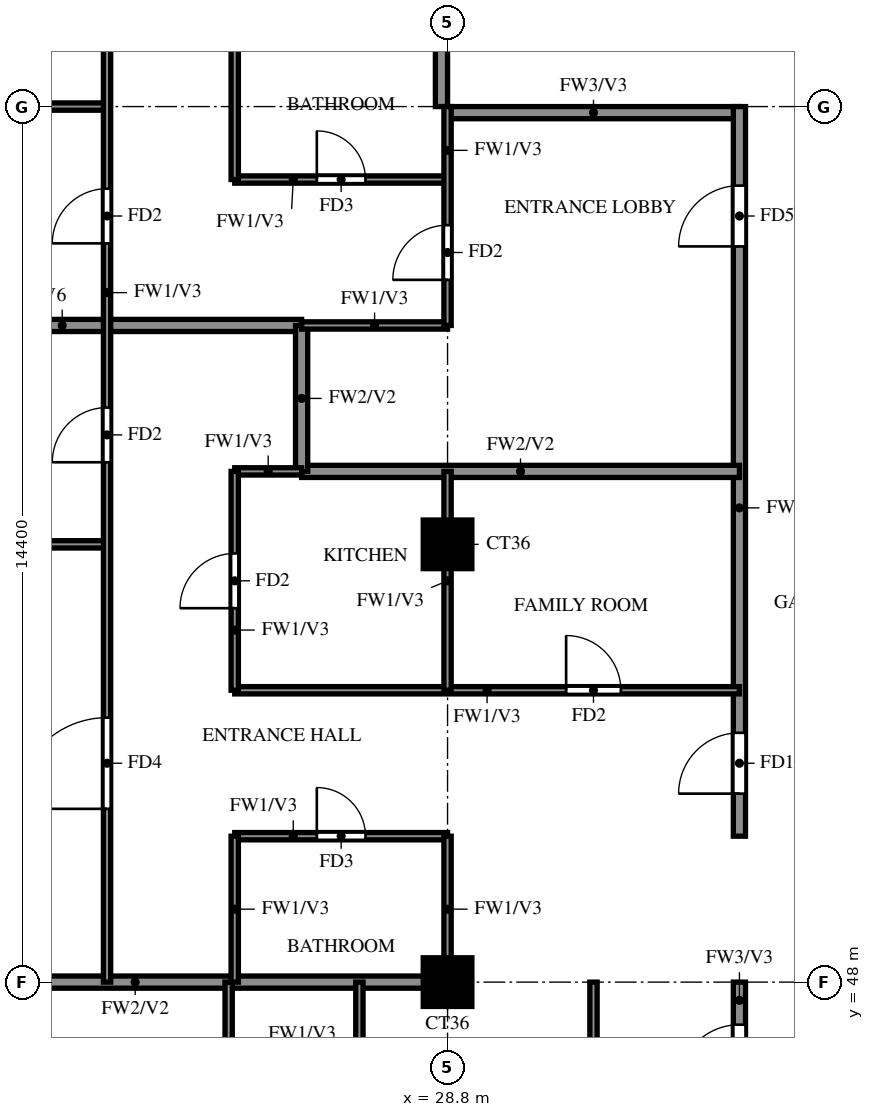
"""IFC4 building model, lengths in metres.
Left out: names, types, materials, properties, quantities, classifications, styles, units other than length and angle.
Written with IfcOpenShell. Run it as: python <this file> out.ifc"""

import sys

from ifc_helpers import new_model, si_unit, direction, frame, frame_2d, origin, origin_2d, place, context, subcontext, project, spatial, rectangle, extrude, source, transform, mapped, element, fill, save


model = new_model("IFC4")
c1 = context("Model", 3, precision=1e-05, world=origin(), true_north=direction((0.0, 1.0)))
c2 = subcontext(c1, "Body", "Model", "MODEL_VIEW")
j1 = project(units=[si_unit("LENGTHUNIT", "METRE"), si_unit("PLANEANGLEUNIT", "RADIAN")], contexts=[c1])
p1 = place(None, origin())
s1 = spatial("IfcSite", under=j1, at=p1, CompositionType="ELEMENT")
p2 = place(p1, origin())
s2 = spatial("IfcBuilding", under=s1, at=p2, CompositionType="ELEMENT")
p3 = place(p2, frame((0.0, 0.0, 236.0)))
s3 = spatial("IfcBuildingStorey", under=s2, at=p3, CompositionType="ELEMENT", Elevation=236.0)
m1 = source(origin(), c2, "Body", "SweptSolid", [
    extrude(rectangle(XDim=0.8, YDim=0.8, at=origin_2d()), origin(), (0.0, 0.0, 1.0), 3.22),
])
for number, where, z_axis, x_axis in (
    (1, (28.8, 48.0, 0.0), (0.0, 0.0, 1.0), (1.0, 0.0, 0.0)),
    (2, (28.8, 55.2, 0.0), (0.0, 0.0, 1.0), (1.0, 0.0, 0.0)),
):
    element("IfcColumn", number, at=place(p3, frame(where, z_axis=z_axis, x_axis=x_axis)), inside=s3, PredefinedType="COLUMN", context=c2, shape_type="MappedRepresentation", body=[
        mapped(m1, transform((0.0, 0.0, 0.0))),
    ])
p4 = place(p3, frame((28.8, 62.3, 0.0), z_axis=(0.0, 0.0, 1.0), x_axis=(1.0, 0.0, 0.0)))
e3 = element("IfcWall", 3, at=p4, inside=s3, PredefinedType="SOLIDWALL", context=c2, shape_type="SweptSolid", body=[
    extrude(rectangle(XDim=4.8, YDim=0.2, at=frame_2d((2.4, 0.0))), origin(), (0.0, 0.0, 1.0), 3.22),
])
p5 = place(p3, frame((28.7, 62.4, 0.0), z_axis=(0.0, 0.0, 1.0), x_axis=(0.0, 1.0, 0.0)))
e4 = element("IfcWall", 4, at=p5, inside=s3, PredefinedType="SOLIDWALL", context=c2, shape_type="SweptSolid", body=[
    extrude(rectangle(XDim=15.6, YDim=0.2, at=frame_2d((7.8, 0.0))), origin(), (0.0, 0.0, 1.0), 3.22),
])
p6 = place(p3, frame((33.6, 45.6, 0.0), z_axis=(0.0, 0.0, 1.0), x_axis=(0.0, 1.0, 0.0)))
e5 = element("IfcWall", 5, at=p6, inside=s3, PredefinedType="SOLIDWALL", context=c2, shape_type="SweptSolid", body=[
    extrude(rectangle(XDim=2.4, YDim=0.2, at=frame_2d((1.2, 0.0))), origin(), (0.0, 0.0, 1.0), 3.22),
])
p7 = place(p6, frame((0.7, 0.0, 0.0)))
e6 = element("IfcOpeningElement", 6, at=p7, cuts=e5, PredefinedType="OPENING", context=c2, shape_type="SweptSolid", body=[
    extrude(rectangle(XDim=1.0, YDim=2.1, at=frame_2d((0.5, 1.05))), frame((0.0, 0.11, 0.0), z_axis=(0.0, -1.0, 0.0), x_axis=(1.0, 0.0, 0.0)), (0.0, 0.0, 1.0), 0.22),
])
p8 = place(p3, frame((33.6, 50.4, 0.0), z_axis=(0.0, 0.0, 1.0), x_axis=(0.0, 1.0, 0.0)))
e7 = element("IfcWall", 7, at=p8, inside=s3, PredefinedType="SOLIDWALL", context=c2, shape_type="SweptSolid", body=[
    extrude(rectangle(XDim=12.0, YDim=0.2, at=frame_2d((6.0, 0.0))), origin(), (0.0, 0.0, 1.0), 3.22),
])
p9 = place(p8, frame((0.7, 0.0, 0.0)))
e8 = element("IfcOpeningElement", 8, at=p9, cuts=e7, PredefinedType="OPENING", context=c2, shape_type="SweptSolid", body=[
    extrude(rectangle(XDim=1.0, YDim=2.1, at=frame_2d((0.5, 1.05))), frame((0.0, 0.11, 0.0), z_axis=(0.0, -1.0, 0.0), x_axis=(1.0, 0.0, 0.0)), (0.0, 0.0, 1.0), 0.22),
])
p10 = place(p8, frame((9.7, 0.0, 0.0)))
e9 = element("IfcOpeningElement", 9, at=p10, cuts=e7, PredefinedType="OPENING", context=c2, shape_type="SweptSolid", body=[
    extrude(rectangle(XDim=1.0, YDim=2.1, at=frame_2d((0.5, 1.05))), frame((0.0, 0.11, 0.0), z_axis=(0.0, -1.0, 0.0), x_axis=(1.0, 0.0, 0.0)), (0.0, 0.0, 1.0), 0.22),
])
p11 = place(p3, frame((18.525, 48.0, 0.0), z_axis=(0.0, 0.0, 1.0), x_axis=(1.0, 0.0, 0.0)))
e10 = element("IfcWall", 10, at=p11, inside=s3, PredefinedType="SOLIDWALL", context=c2, shape_type="SweptSolid", body=[
    extrude(rectangle(XDim=10.275, YDim=0.2, at=frame_2d((5.138, 0.0))), origin(), (0.0, 0.0, 1.0), 3.22),
])
p12 = place(p3, frame((26.4, 56.4, 0.0), z_axis=(0.0, 0.0, 1.0), x_axis=(1.0, 0.0, 0.0)))
e11 = element("IfcWall", 11, at=p12, inside=s3, PredefinedType="SOLIDWALL", context=c2, shape_type="SweptSolid", body=[
    extrude(rectangle(XDim=7.2, YDim=0.2, at=frame_2d((3.6, 0.0))), origin(), (0.0, 0.0, 1.0), 3.22),
])
p13 = place(p3, frame((18.525, 58.8, 0.0), z_axis=(0.0, 0.0, 1.0), x_axis=(1.0, 0.0, 0.0)))
e12 = element("IfcWall", 12, at=p13, inside=s3, PredefinedType="SOLIDWALL", context=c2, shape_type="SweptSolid", body=[
    extrude(rectangle(XDim=7.875, YDim=0.2, at=frame_2d((3.938, 0.0))), origin(), (0.0, 0.0, 1.0), 2.32),
])
p14 = place(p3, frame((26.4, 56.4, 0.0), z_axis=(0.0, 0.0, 1.0), x_axis=(0.0, 1.0, 0.0)))
e13 = element("IfcWall", 13, at=p14, inside=s3, PredefinedType="SOLIDWALL", context=c2, shape_type="SweptSolid", body=[
    extrude(rectangle(XDim=2.4, YDim=0.2, at=frame_2d((1.2, 0.0))), origin(), (0.0, 0.0, 1.0), 3.22),
])
p15 = place(p3, frame((25.3, 50.4, 0.0), z_axis=(0.0, 0.0, 1.0), x_axis=(1.0, 0.0, 0.0)))
e14 = element("IfcWall", 14, at=p15, inside=s3, PredefinedType="PARTITIONING", context=c2, shape_type="SweptSolid", body=[
    extrude(rectangle(XDim=3.5, YDim=0.12, at=frame_2d((1.75, 0.0))), origin(), (0.0, 0.0, 1.0), 3.22),
])
p16 = place(p15, frame((1.35, 0.0, 0.0)))
e15 = element("IfcOpeningElement", 15, at=p16, cuts=e14, PredefinedType="OPENING", context=c2, shape_type="SweptSolid", body=[
    extrude(rectangle(XDim=0.8, YDim=2.1, at=frame_2d((0.4, 1.05))), frame((0.0, 0.07, 0.0), z_axis=(0.0, -1.0, 0.0), x_axis=(1.0, 0.0, 0.0)), (0.0, 0.0, 1.0), 0.14),
])
p17 = place(p3, frame((25.3, 52.8, 0.0), z_axis=(0.0, 0.0, 1.0), x_axis=(1.0, 0.0, 0.0)))
e16 = element("IfcWall", 16, at=p17, inside=s3, PredefinedType="PARTITIONING", context=c2, shape_type="SweptSolid", body=[
    extrude(rectangle(XDim=8.3, YDim=0.12, at=frame_2d((4.15, 0.0))), origin(), (0.0, 0.0, 1.0), 3.22),
])
p18 = place(p17, frame((5.45, 0.0, 0.0)))
e17 = element("IfcOpeningElement", 17, at=p18, cuts=e16, PredefinedType="OPENING", context=c2, shape_type="SweptSolid", body=[
    extrude(rectangle(XDim=0.9, YDim=2.1, at=frame_2d((0.45, 1.05))), frame((0.0, 0.07, 0.0), z_axis=(0.0, -1.0, 0.0), x_axis=(1.0, 0.0, 0.0)), (0.0, 0.0, 1.0), 0.14),
])
p19 = place(p3, frame((18.525, 55.2, 0.0), z_axis=(0.0, 0.0, 1.0), x_axis=(1.0, 0.0, 0.0)))
e18 = element("IfcWall", 18, at=p19, inside=s3, PredefinedType="PARTITIONING", context=c2, shape_type="SweptSolid", body=[
    extrude(rectangle(XDim=4.675, YDim=0.12, at=frame_2d((2.337, 0.0))), origin(), (0.0, 0.0, 1.0), 3.22),
])
p20 = place(p3, frame((25.3, 56.4, 0.0), z_axis=(0.0, 0.0, 1.0), x_axis=(1.0, 0.0, 0.0)))
e19 = element("IfcWall", 19, at=p20, inside=s3, PredefinedType="PARTITIONING", context=c2, shape_type="SweptSolid", body=[
    extrude(rectangle(XDim=1.1, YDim=0.12, at=frame_2d((0.55, 0.0))), origin(), (0.0, 0.0, 1.0), 3.22),
])
p21 = place(p3, frame((26.4, 58.8, 0.0), z_axis=(0.0, 0.0, 1.0), x_axis=(1.0, 0.0, 0.0)))
e20 = element("IfcWall", 20, at=p21, inside=s3, PredefinedType="PARTITIONING", context=c2, shape_type="SweptSolid", body=[
    extrude(rectangle(XDim=2.4, YDim=0.12, at=frame_2d((1.2, 0.0))), origin(), (0.0, 0.0, 1.0), 3.22),
])
p22 = place(p3, frame((25.3, 61.2, 0.0), z_axis=(0.0, 0.0, 1.0), x_axis=(1.0, 0.0, 0.0)))
e21 = element("IfcWall", 21, at=p22, inside=s3, PredefinedType="PARTITIONING", context=c2, shape_type="SweptSolid", body=[
    extrude(rectangle(XDim=3.5, YDim=0.12, at=frame_2d((1.75, 0.0))), origin(), (0.0, 0.0, 1.0), 3.22),
])
p23 = place(p22, frame((1.35, 0.0, 0.0)))
e22 = element("IfcOpeningElement", 22, at=p23, cuts=e21, PredefinedType="OPENING", context=c2, shape_type="SweptSolid", body=[
    extrude(rectangle(XDim=0.8, YDim=2.1, at=frame_2d((0.4, 1.05))), frame((0.0, 0.07, 0.0), z_axis=(0.0, -1.0, 0.0), x_axis=(1.0, 0.0, 0.0)), (0.0, 0.0, 1.0), 0.14),
])
p24 = place(p3, frame((18.525, 62.4, 0.0), z_axis=(0.0, 0.0, 1.0), x_axis=(1.0, 0.0, 0.0)))
e23 = element("IfcWall", 23, at=p24, inside=s3, PredefinedType="PARTITIONING", context=c2, shape_type="SweptSolid", body=[
    extrude(rectangle(XDim=4.675, YDim=0.12, at=frame_2d((2.337, 0.0))), origin(), (0.0, 0.0, 1.0), 3.22),
])
p25 = place(p3, frame((23.2, 48.0, 0.0), z_axis=(0.0, 0.0, 1.0), x_axis=(0.0, 1.0, 0.0)))
e24 = element("IfcWall", 24, at=p25, inside=s3, PredefinedType="PARTITIONING", context=c2, shape_type="SweptSolid", body=[
    extrude(rectangle(XDim=25.2, YDim=0.12, at=frame_2d((12.6, 0.0))), origin(), (0.0, 0.0, 1.0), 3.22),
])
p26 = place(p25, frame((2.85, 0.0, 0.0)))
e25 = element("IfcOpeningElement", 25, at=p26, cuts=e24, PredefinedType="OPENING", context=c2, shape_type="SweptSolid", body=[
    extrude(rectangle(XDim=1.5, YDim=2.1, at=frame_2d((0.75, 1.05))), frame((0.0, 0.07, 0.0), z_axis=(0.0, -1.0, 0.0), x_axis=(1.0, 0.0, 0.0)), (0.0, 0.0, 1.0), 0.14),
])
p27 = place(p25, frame((8.55, 0.0, 0.0)))
e26 = element("IfcOpeningElement", 26, at=p27, cuts=e24, PredefinedType="OPENING", context=c2, shape_type="SweptSolid", body=[
    extrude(rectangle(XDim=0.9, YDim=2.1, at=frame_2d((0.45, 1.05))), frame((0.0, 0.07, 0.0), z_axis=(0.0, -1.0, 0.0), x_axis=(1.0, 0.0, 0.0)), (0.0, 0.0, 1.0), 0.14),
])
p28 = place(p25, frame((12.15, 0.0, 0.0)))
e27 = element("IfcOpeningElement", 27, at=p28, cuts=e24, PredefinedType="OPENING", context=c2, shape_type="SweptSolid", body=[
    extrude(rectangle(XDim=0.9, YDim=2.1, at=frame_2d((0.45, 1.05))), frame((0.0, 0.07, 0.0), z_axis=(0.0, -1.0, 0.0), x_axis=(1.0, 0.0, 0.0)), (0.0, 0.0, 1.0), 0.14),
])
p29 = place(p25, frame((15.75, 0.0, 0.0)))
e28 = element("IfcOpeningElement", 28, at=p29, cuts=e24, PredefinedType="OPENING", context=c2, shape_type="SweptSolid", body=[
    extrude(rectangle(XDim=0.9, YDim=2.1, at=frame_2d((0.45, 1.05))), frame((0.0, 0.07, 0.0), z_axis=(0.0, -1.0, 0.0), x_axis=(1.0, 0.0, 0.0)), (0.0, 0.0, 1.0), 0.14),
])
p30 = place(p25, frame((19.35, 0.0, 0.0)))
e29 = element("IfcOpeningElement", 29, at=p30, cuts=e24, PredefinedType="OPENING", context=c2, shape_type="SweptSolid", body=[
    extrude(rectangle(XDim=0.9, YDim=2.1, at=frame_2d((0.45, 1.05))), frame((0.0, 0.07, 0.0), z_axis=(0.0, -1.0, 0.0), x_axis=(1.0, 0.0, 0.0)), (0.0, 0.0, 1.0), 0.14),
])
p31 = place(p25, frame((22.95, 0.0, 0.0)))
e30 = element("IfcOpeningElement", 30, at=p31, cuts=e24, PredefinedType="OPENING", context=c2, shape_type="SweptSolid", body=[
    extrude(rectangle(XDim=0.9, YDim=2.1, at=frame_2d((0.45, 1.05))), frame((0.0, 0.07, 0.0), z_axis=(0.0, -1.0, 0.0), x_axis=(1.0, 0.0, 0.0)), (0.0, 0.0, 1.0), 0.14),
])
p32 = place(p3, frame((25.2, 39.725, 0.0), z_axis=(0.0, 0.0, 1.0), x_axis=(0.0, 1.0, 0.0)))
e31 = element("IfcWall", 31, at=p32, inside=s3, PredefinedType="PARTITIONING", context=c2, shape_type="SweptSolid", body=[
    extrude(rectangle(XDim=8.275, YDim=0.12, at=frame_2d((4.137, 0.0))), origin(), (0.0, 0.0, 1.0), 3.22),
])
p33 = place(p32, frame((4.525, 0.0, 0.0)))
e32 = element("IfcOpeningElement", 32, at=p33, cuts=e31, PredefinedType="OPENING", context=c2, shape_type="SweptSolid", body=[
    extrude(rectangle(XDim=0.9, YDim=2.1, at=frame_2d((0.45, 1.05))), frame((0.0, 0.07, 0.0), z_axis=(0.0, -1.0, 0.0), x_axis=(1.0, 0.0, 0.0)), (0.0, 0.0, 1.0), 0.14),
])
p34 = place(p3, frame((25.3, 48.0, 0.0), z_axis=(0.0, 0.0, 1.0), x_axis=(0.0, 1.0, 0.0)))
e33 = element("IfcWall", 33, at=p34, inside=s3, PredefinedType="PARTITIONING", context=c2, shape_type="SweptSolid", body=[
    extrude(rectangle(XDim=2.4, YDim=0.12, at=frame_2d((1.2, 0.0))), origin(), (0.0, 0.0, 1.0), 3.22),
])
p35 = place(p3, frame((25.3, 52.8, 0.0), z_axis=(0.0, 0.0, 1.0), x_axis=(0.0, 1.0, 0.0)))
e34 = element("IfcWall", 34, at=p35, inside=s3, PredefinedType="PARTITIONING", context=c2, shape_type="SweptSolid", body=[
    extrude(rectangle(XDim=3.6, YDim=0.12, at=frame_2d((1.8, 0.0))), origin(), (0.0, 0.0, 1.0), 3.22),
])
p36 = place(p35, frame((1.35, 0.0, 0.0)))
e35 = element("IfcOpeningElement", 35, at=p36, cuts=e34, PredefinedType="OPENING", context=c2, shape_type="SweptSolid", body=[
    extrude(rectangle(XDim=0.9, YDim=2.1, at=frame_2d((0.45, 1.05))), frame((0.0, 0.07, 0.0), z_axis=(0.0, -1.0, 0.0), x_axis=(1.0, 0.0, 0.0)), (0.0, 0.0, 1.0), 0.14),
])
p37 = place(p3, frame((25.3, 61.2, 0.0), z_axis=(0.0, 0.0, 1.0), x_axis=(0.0, 1.0, 0.0)))
e36 = element("IfcWall", 36, at=p37, inside=s3, PredefinedType="PARTITIONING", context=c2, shape_type="SweptSolid", body=[
    extrude(rectangle(XDim=12.0, YDim=0.12, at=frame_2d((6.0, 0.0))), origin(), (0.0, 0.0, 1.0), 3.22),
])
p38 = place(p37, frame((4.45, 0.0, 0.0)))
e37 = element("IfcOpeningElement", 37, at=p38, cuts=e36, PredefinedType="OPENING", context=c2, shape_type="SweptSolid", body=[
    extrude(rectangle(XDim=0.9, YDim=2.1, at=frame_2d((0.45, 1.05))), frame((0.0, 0.07, 0.0), z_axis=(0.0, -1.0, 0.0), x_axis=(1.0, 0.0, 0.0)), (0.0, 0.0, 1.0), 0.14),
])
p39 = place(p37, frame((9.225, 0.0, 0.0)))
e38 = element("IfcOpeningElement", 38, at=p39, cuts=e36, PredefinedType="OPENING", context=c2, shape_type="SweptSolid", body=[
    extrude(rectangle(XDim=0.9, YDim=2.1, at=frame_2d((0.45, 1.05))), frame((0.0, 0.07, 0.0), z_axis=(0.0, -1.0, 0.0), x_axis=(1.0, 0.0, 0.0)), (0.0, 0.0, 1.0), 0.14),
])
for number, where, z_axis, x_axis in (
    (39, (27.35, 45.6, 0.0), (0.0, 0.0, 1.0), (0.0, 1.0, 0.0)),
    (40, (28.8, 48.0, 0.0), (0.0, 0.0, 1.0), (0.0, 1.0, 0.0)),
):
    element("IfcWall", number, at=place(p3, frame(where, z_axis=z_axis, x_axis=x_axis)), inside=s3, PredefinedType="PARTITIONING", context=c2, shape_type="SweptSolid", body=[
        extrude(rectangle(XDim=2.4, YDim=0.12, at=frame_2d((1.2, 0.0))), origin(), (0.0, 0.0, 1.0), 3.22),
    ])
p40 = place(p3, frame((28.8, 52.8, 0.0), z_axis=(0.0, 0.0, 1.0), x_axis=(0.0, 1.0, 0.0)))
e41 = element("IfcWall", 41, at=p40, inside=s3, PredefinedType="PARTITIONING", context=c2, shape_type="SweptSolid", body=[
    extrude(rectangle(XDim=3.6, YDim=0.12, at=frame_2d((1.8, 0.0))), origin(), (0.0, 0.0, 1.0), 3.22),
])
p41 = place(p3, frame((28.8, 58.8, 0.0), z_axis=(0.0, 0.0, 1.0), x_axis=(0.0, 1.0, 0.0)))
e42 = element("IfcWall", 42, at=p41, inside=s3, PredefinedType="PARTITIONING", context=c2, shape_type="SweptSolid", body=[
    extrude(rectangle(XDim=3.6, YDim=0.12, at=frame_2d((1.8, 0.0))), origin(), (0.0, 0.0, 1.0), 3.22),
])
p42 = place(p41, frame((0.75, 0.0, 0.0)))
e43 = element("IfcOpeningElement", 43, at=p42, cuts=e42, PredefinedType="OPENING", context=c2, shape_type="SweptSolid", body=[
    extrude(rectangle(XDim=0.9, YDim=2.1, at=frame_2d((0.45, 1.05))), frame((0.0, 0.07, 0.0), z_axis=(0.0, -1.0, 0.0), x_axis=(1.0, 0.0, 0.0)), (0.0, 0.0, 1.0), 0.14),
])
p43 = place(p3, frame((31.2, 45.6, 0.0), z_axis=(0.0, 0.0, 1.0), x_axis=(0.0, 1.0, 0.0)))
e44 = element("IfcWall", 44, at=p43, inside=s3, PredefinedType="PARTITIONING", context=c2, shape_type="SweptSolid", body=[
    extrude(rectangle(XDim=2.4, YDim=0.12, at=frame_2d((1.2, 0.0))), origin(), (0.0, 0.0, 1.0), 3.22),
])
p44 = place(p7, origin())
e45 = element("IfcDoor", 45, at=p44, inside=s3, OperationType="SINGLE_SWING_RIGHT", PredefinedType="DOOR", context=c2, shape_type="SweptSolid", body=[
    extrude(rectangle(XDim=1.0, YDim=2.1, at=frame_2d((0.5, 1.05))), frame((0.0, 0.025, 0.0), z_axis=(0.0, -1.0, 0.0), x_axis=(1.0, 0.0, 0.0)), (0.0, 0.0, 1.0), 0.05),
])
fill(e6, e45)
p45 = place(p9, origin())
e46 = element("IfcDoor", 46, at=p45, inside=s3, OperationType="SINGLE_SWING_LEFT", PredefinedType="DOOR", context=c2, shape_type="SweptSolid", body=[
    extrude(rectangle(XDim=1.0, YDim=2.1, at=frame_2d((0.5, 1.05))), frame((0.0, 0.025, 0.0), z_axis=(0.0, -1.0, 0.0), x_axis=(1.0, 0.0, 0.0)), (0.0, 0.0, 1.0), 0.05),
])
fill(e8, e46)
p46 = place(p26, origin())
e47 = element("IfcDoor", 47, at=p46, inside=s3, OperationType="SINGLE_SWING_LEFT", PredefinedType="DOOR", context=c2, shape_type="SweptSolid", body=[
    extrude(rectangle(XDim=1.5, YDim=2.1, at=frame_2d((0.75, 1.05))), frame((0.0, 0.025, 0.0), z_axis=(0.0, -1.0, 0.0), x_axis=(1.0, 0.0, 0.0)), (0.0, 0.0, 1.0), 0.05),
])
fill(e25, e47)
p47 = place(p27, origin())
e48 = element("IfcDoor", 48, at=p47, inside=s3, OperationType="SINGLE_SWING_RIGHT", PredefinedType="DOOR", context=c2, shape_type="SweptSolid", body=[
    extrude(rectangle(XDim=0.9, YDim=2.1, at=frame_2d((0.45, 1.05))), frame((0.0, 0.025, 0.0), z_axis=(0.0, -1.0, 0.0), x_axis=(1.0, 0.0, 0.0)), (0.0, 0.0, 1.0), 0.05),
])
fill(e26, e48)
p48 = place(p16, origin())
e49 = element("IfcDoor", 49, at=p48, inside=s3, OperationType="SINGLE_SWING_LEFT", PredefinedType="DOOR", context=c2, shape_type="SweptSolid", body=[
    extrude(rectangle(XDim=0.8, YDim=2.1, at=frame_2d((0.4, 1.05))), frame((0.0, 0.025, 0.0), z_axis=(0.0, -1.0, 0.0), x_axis=(1.0, 0.0, 0.0)), (0.0, 0.0, 1.0), 0.05),
])
fill(e15, e49)
p49 = place(p36, origin())
e50 = element("IfcDoor", 50, at=p49, inside=s3, OperationType="SINGLE_SWING_LEFT", PredefinedType="DOOR", context=c2, shape_type="SweptSolid", body=[
    extrude(rectangle(XDim=0.9, YDim=2.1, at=frame_2d((0.45, 1.05))), frame((0.0, 0.025, 0.0), z_axis=(0.0, -1.0, 0.0), x_axis=(1.0, 0.0, 0.0)), (0.0, 0.0, 1.0), 0.05),
])
fill(e35, e50)
p50 = place(p18, origin())
e51 = element("IfcDoor", 51, at=p50, inside=s3, OperationType="SINGLE_SWING_RIGHT", PredefinedType="DOOR", context=c2, shape_type="SweptSolid", body=[
    extrude(rectangle(XDim=0.9, YDim=2.1, at=frame_2d((0.45, 1.05))), frame((0.0, 0.025, 0.0), z_axis=(0.0, -1.0, 0.0), x_axis=(1.0, 0.0, 0.0)), (0.0, 0.0, 1.0), 0.05),
])
fill(e17, e51)
p51 = place(p42, origin())
e52 = element("IfcDoor", 52, at=p51, inside=s3, OperationType="SINGLE_SWING_LEFT", PredefinedType="DOOR", context=c2, shape_type="SweptSolid", body=[
    extrude(rectangle(XDim=0.9, YDim=2.1, at=frame_2d((0.45, 1.05))), frame((0.0, 0.025, 0.0), z_axis=(0.0, -1.0, 0.0), x_axis=(1.0, 0.0, 0.0)), (0.0, 0.0, 1.0), 0.05),
])
fill(e43, e52)
p52 = place(p10, origin())
e53 = element("IfcDoor", 53, at=p52, inside=s3, OperationType="SINGLE_SWING_LEFT", PredefinedType="DOOR", context=c2, shape_type="SweptSolid", body=[
    extrude(rectangle(XDim=1.0, YDim=2.1, at=frame_2d((0.5, 1.05))), frame((0.0, 0.025, 0.0), z_axis=(0.0, -1.0, 0.0), x_axis=(1.0, 0.0, 0.0)), (0.0, 0.0, 1.0), 0.05),
])
fill(e9, e53)
p53 = place(p28, origin())
e54 = element("IfcDoor", 54, at=p53, inside=s3, OperationType="SINGLE_SWING_RIGHT", PredefinedType="DOOR", context=c2, shape_type="SweptSolid", body=[
    extrude(rectangle(XDim=0.9, YDim=2.1, at=frame_2d((0.45, 1.05))), frame((0.0, 0.025, 0.0), z_axis=(0.0, -1.0, 0.0), x_axis=(1.0, 0.0, 0.0)), (0.0, 0.0, 1.0), 0.05),
])
fill(e27, e54)
p54 = place(p23, origin())
e55 = element("IfcDoor", 55, at=p54, inside=s3, OperationType="SINGLE_SWING_LEFT", PredefinedType="DOOR", context=c2, shape_type="SweptSolid", body=[
    extrude(rectangle(XDim=0.8, YDim=2.1, at=frame_2d((0.4, 1.05))), frame((0.0, 0.025, 0.0), z_axis=(0.0, -1.0, 0.0), x_axis=(1.0, 0.0, 0.0)), (0.0, 0.0, 1.0), 0.05),
])
fill(e22, e55)
save(model, sys.argv[1])
